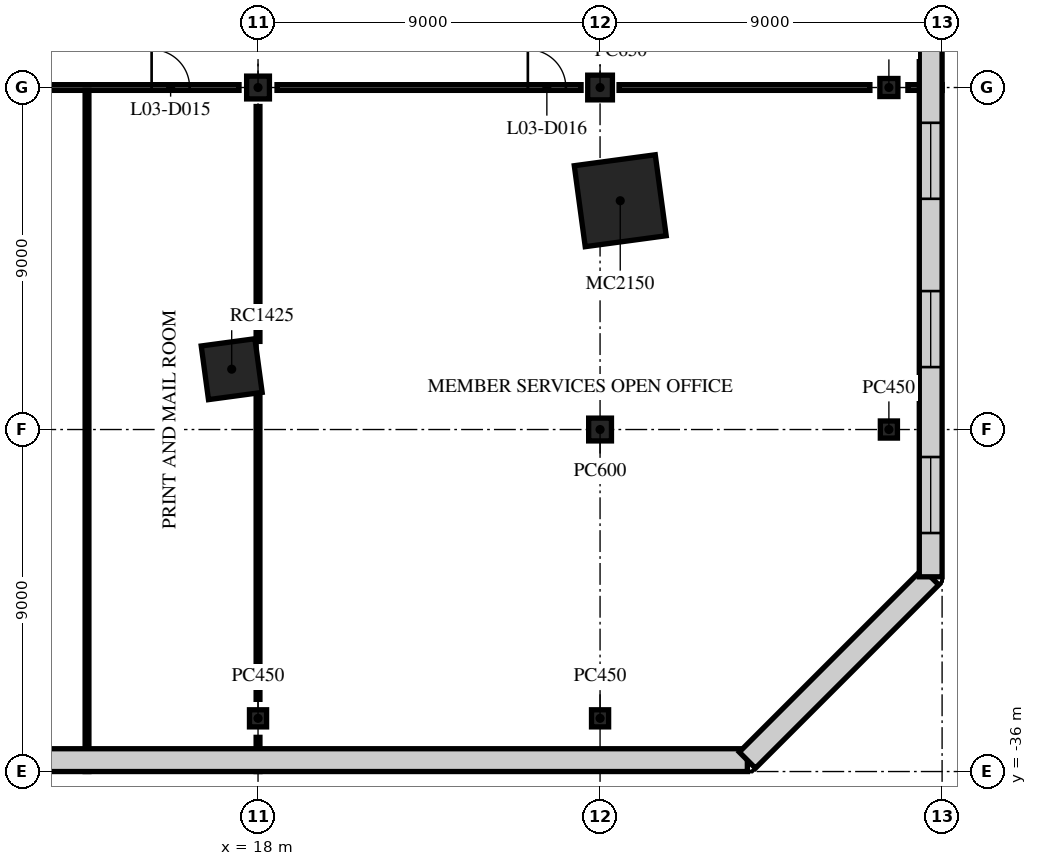
"""IFC4 building model, lengths in metres.
Left out: names, types, materials, properties, quantities, classifications, styles, units other than length and angle.
Written with IfcOpenShell. Run it as: python <this file> out.ifc"""

import sys

from ifc_helpers import new_model, si_unit, direction, frame, frame_2d, origin, origin_2d, place, context, subcontext, project, spatial, rectangle, extrude, element, fill, save


model = new_model("IFC4")
c1 = context("Model", 3, precision=1e-05, world=origin(), true_north=direction((0.0, 1.0)))
c2 = subcontext(c1, "Body", "Model", "MODEL_VIEW")
j1 = project(units=[si_unit("LENGTHUNIT", "METRE"), si_unit("PLANEANGLEUNIT", "RADIAN")], contexts=[c1])
p1 = place(None, origin())
s1 = spatial("IfcSite", under=j1, at=p1, CompositionType="ELEMENT")
p2 = place(p1, origin())
s2 = spatial("IfcBuilding", under=s1, at=p2, CompositionType="ELEMENT")
p3 = place(p2, frame((0.0, 0.0, 13.5)))
s3 = spatial("IfcBuildingStorey", under=s2, at=p3, CompositionType="ELEMENT", Elevation=13.5)
p4 = place(p3, frame((18.0, -34.6, 0.0), z_axis=(0.0, 0.0, 1.0), x_axis=(1.0, 0.0, 0.0)))
e1 = element("IfcColumn", 1, at=p4, inside=s3, PredefinedType="COLUMN", context=c2, shape_type="SweptSolid", body=[
    extrude(rectangle(XDim=0.45, YDim=0.45, at=origin_2d()), origin(), (0.0, 0.0, 1.0), 4.5),
])
p5 = place(p3, frame((18.0, -18.0, 0.0), z_axis=(0.0, 0.0, 1.0), x_axis=(1.0, 0.0, 0.0)))
e2 = element("IfcColumn", 2, at=p5, inside=s3, PredefinedType="COLUMN", context=c2, shape_type="SweptSolid", body=[
    extrude(rectangle(XDim=0.6, YDim=0.6, at=origin_2d()), origin(), (0.0, 0.0, 1.0), 4.5),
])
p6 = place(p3, frame((27.0, -34.6, 0.0), z_axis=(0.0, 0.0, 1.0), x_axis=(1.0, 0.0, 0.0)))
e3 = element("IfcColumn", 3, at=p6, inside=s3, PredefinedType="COLUMN", context=c2, shape_type="SweptSolid", body=[
    extrude(rectangle(XDim=0.45, YDim=0.45, at=origin_2d()), origin(), (0.0, 0.0, 1.0), 4.5),
])
p7 = place(p3, frame((27.0, -27.0, 0.0), z_axis=(0.0, 0.0, 1.0), x_axis=(1.0, 0.0, 0.0)))
e4 = element("IfcColumn", 4, at=p7, inside=s3, PredefinedType="COLUMN", context=c2, shape_type="SweptSolid", body=[
    extrude(rectangle(XDim=0.6, YDim=0.6, at=origin_2d()), origin(), (0.0, 0.0, 1.0), 4.5),
])
p8 = place(p3, frame((27.0, -18.0, 0.0), z_axis=(0.0, 0.0, 1.0), x_axis=(1.0, 0.0, 0.0)))
e5 = element("IfcColumn", 5, at=p8, inside=s3, PredefinedType="COLUMN", context=c2, shape_type="SweptSolid", body=[
    extrude(rectangle(XDim=0.65, YDim=0.65, at=origin_2d()), origin(), (0.0, 0.0, 1.0), 4.5),
])
p9 = place(p3, frame((34.6, -27.0, 0.0), z_axis=(0.0, 0.0, 1.0), x_axis=(1.0, 0.0, 0.0)))
e6 = element("IfcColumn", 6, at=p9, inside=s3, PredefinedType="COLUMN", context=c2, shape_type="SweptSolid", body=[
    extrude(rectangle(XDim=0.45, YDim=0.45, at=origin_2d()), origin(), (0.0, 0.0, 1.0), 4.5),
])
p10 = place(p3, frame((34.6, -18.0, 0.0), z_axis=(0.0, 0.0, 1.0), x_axis=(1.0, 0.0, 0.0)))
e7 = element("IfcColumn", 7, at=p10, inside=s3, PredefinedType="COLUMN", context=c2, shape_type="SweptSolid", body=[
    extrude(rectangle(XDim=0.475, YDim=0.475, at=origin_2d()), origin(), (0.0, 0.0, 1.0), 4.5),
])
p11 = place(p3, frame((17.307, -25.412, 0.0), z_axis=(0.0, 0.0, 1.0), x_axis=(0.991001197216, 0.133853005627, 0.0)))
e8 = element("IfcColumn", 8, at=p11, inside=s3, PredefinedType="COLUMN", context=c2, shape_type="SweptSolid", body=[
    extrude(rectangle(XDim=1.425, YDim=1.425, at=origin_2d()), origin(), (0.0, 0.0, 1.0), 4.5),
])
p12 = place(p3, frame((27.531, -20.979, 0.0), z_axis=(0.0, 0.0, 1.0), x_axis=(0.991001197216, 0.133853005627, 0.0)))
e9 = element("IfcColumn", 9, at=p12, inside=s3, PredefinedType="COLUMN", context=c2, shape_type="SweptSolid", body=[
    extrude(rectangle(XDim=2.15, YDim=2.15, at=origin_2d()), origin(), (0.0, 0.0, 1.0), 4.5),
])
p13 = place(p3, frame((9.5, -18.0, 0.0), z_axis=(0.0, 0.0, 1.0), x_axis=(1.0, 0.0, 0.0)))
e10 = element("IfcWall", 10, at=p13, inside=s3, PredefinedType="PARTITIONING", context=c2, shape_type="SweptSolid", body=[
    extrude(rectangle(XDim=8.0, YDim=0.15, at=frame_2d((4.0, 0.0))), origin(), (0.0, 0.0, 1.0), 4.1),
])
p14 = place(p13, frame((5.7, 0.0, 0.0)))
e11 = element("IfcOpeningElement", 11, at=p14, cuts=e10, PredefinedType="OPENING", context=c2, shape_type="SweptSolid", body=[
    extrude(rectangle(XDim=1.0, YDim=2.1, at=frame_2d((0.5, 1.05))), frame((0.0, 0.085, 0.0), z_axis=(0.0, -1.0, 0.0), x_axis=(1.0, 0.0, 0.0)), (0.0, 0.0, 1.0), 0.17),
])
p15 = place(p3, frame((18.5, -18.0, 0.0), z_axis=(0.0, 0.0, 1.0), x_axis=(1.0, 0.0, 0.0)))
e12 = element("IfcWall", 12, at=p15, inside=s3, PredefinedType="PARTITIONING", context=c2, shape_type="SweptSolid", body=[
    extrude(rectangle(XDim=8.0, YDim=0.15, at=frame_2d((4.0, 0.0))), origin(), (0.0, 0.0, 1.0), 4.1),
])
p16 = place(p15, frame((6.6, 0.0, 0.0)))
e13 = element("IfcOpeningElement", 13, at=p16, cuts=e12, PredefinedType="OPENING", context=c2, shape_type="SweptSolid", body=[
    extrude(rectangle(XDim=1.0, YDim=2.1, at=frame_2d((0.5, 1.05))), frame((0.0, 0.085, 0.0), z_axis=(0.0, -1.0, 0.0), x_axis=(1.0, 0.0, 0.0)), (0.0, 0.0, 1.0), 0.17),
])
p17 = place(p3, frame((27.5, -18.0, 0.0), z_axis=(0.0, 0.0, 1.0), x_axis=(1.0, 0.0, 0.0)))
e14 = element("IfcWall", 14, at=p17, inside=s3, PredefinedType="PARTITIONING", context=c2, shape_type="SweptSolid", body=[
    extrude(rectangle(XDim=6.6, YDim=0.15, at=frame_2d((3.3, 0.0))), origin(), (0.0, 0.0, 1.0), 4.1),
])
p18 = place(p3, frame((35.1, -18.0, 0.0), z_axis=(0.0, 0.0, 1.0), x_axis=(1.0, 0.0, 0.0)))
e15 = element("IfcWall", 15, at=p18, inside=s3, PredefinedType="PARTITIONING", context=c2, shape_type="SweptSolid", body=[
    extrude(rectangle(XDim=0.9, YDim=0.15, at=frame_2d((0.45, 0.0))), origin(), (0.0, 0.0, 1.0), 4.1),
])
p19 = place(p3, frame((13.5, -36.0, 0.0), z_axis=(0.0, 0.0, 1.0), x_axis=(0.0, 1.0, 0.0)))
e16 = element("IfcWall", 16, at=p19, inside=s3, PredefinedType="PARTITIONING", context=c2, shape_type="SweptSolid", body=[
    extrude(rectangle(XDim=17.925, YDim=0.1, at=frame_2d((8.962, 0.0))), origin(), (0.0, 0.0, 1.0), 4.1),
])
p20 = place(p3, frame((18.0, -36.0, 0.0), z_axis=(0.0, 0.0, 1.0), x_axis=(0.0, 1.0, 0.0)))
e17 = element("IfcWall", 17, at=p20, inside=s3, PredefinedType="PARTITIONING", context=c2, shape_type="SweptSolid", body=[
    extrude(rectangle(XDim=0.9, YDim=0.1, at=frame_2d((0.45, 0.0))), origin(), (0.0, 0.0, 1.0), 4.1),
])
p21 = place(p3, frame((18.0, -34.1, 0.0), z_axis=(0.0, 0.0, 1.0), x_axis=(0.0, 1.0, 0.0)))
e18 = element("IfcWall", 18, at=p21, inside=s3, PredefinedType="PARTITIONING", context=c2, shape_type="SweptSolid", body=[
    extrude(rectangle(XDim=7.957, YDim=0.1, at=frame_2d((3.979, 0.0))), origin(), (0.0, 0.0, 1.0), 4.1),
])
p22 = place(p3, frame((18.0, -24.681, 0.0), z_axis=(0.0, 0.0, 1.0), x_axis=(0.0, 1.0, 0.0)))
e19 = element("IfcWall", 19, at=p22, inside=s3, PredefinedType="PARTITIONING", context=c2, shape_type="SweptSolid", body=[
    extrude(rectangle(XDim=6.181, YDim=0.1, at=frame_2d((3.09, 0.0))), origin(), (0.0, 0.0, 1.0), 4.1),
])
p23 = place(p3, frame((-30.876, -35.7, 0.0), z_axis=(0.0, 0.0, 1.0), x_axis=(1.0, 0.0, 0.0)))
e20 = element("IfcWall", 20, at=p23, inside=s3, PredefinedType="STANDARD", context=c2, shape_type="SweptSolid", body=[
    extrude(rectangle(XDim=61.751, YDim=0.6, at=frame_2d((30.876, 0.0))), origin(), (0.0, 0.0, 1.0), 4.1),
])
p24 = place(p3, frame((30.876, -35.7, 0.0), z_axis=(0.0, 0.0, 1.0), x_axis=(0.707106781187, 0.707106781187, 0.0)))
e21 = element("IfcWall", 21, at=p24, inside=s3, PredefinedType="STANDARD", context=c2, shape_type="SweptSolid", body=[
    extrude(rectangle(XDim=6.823, YDim=0.6, at=frame_2d((3.411, 0.0))), origin(), (0.0, 0.0, 1.0), 4.1),
])
p25 = place(p3, frame((35.7, -30.876, 0.0), z_axis=(0.0, 0.0, 1.0), x_axis=(0.0, 1.0, 0.0)))
e22 = element("IfcWall", 22, at=p25, inside=s3, PredefinedType="STANDARD", context=c2, shape_type="SweptSolid", body=[
    extrude(rectangle(XDim=61.751, YDim=0.6, at=frame_2d((30.876, 0.0))), origin(), (0.0, 0.0, 1.0), 4.1),
])
p26 = place(p25, frame((1.152, 0.0, 0.9)))
e23 = element("IfcOpeningElement", 23, at=p26, cuts=e22, PredefinedType="OPENING", context=c2, shape_type="SweptSolid", body=[
    extrude(rectangle(XDim=2.0, YDim=3.0, at=frame_2d((1.0, 1.5))), frame((0.0, 0.31, 0.0), z_axis=(0.0, -1.0, 0.0), x_axis=(1.0, 0.0, 0.0)), (0.0, 0.0, 1.0), 0.62),
])
p27 = place(p25, frame((5.519, 0.0, 0.9)))
e24 = element("IfcOpeningElement", 24, at=p27, cuts=e22, PredefinedType="OPENING", context=c2, shape_type="SweptSolid", body=[
    extrude(rectangle(XDim=2.0, YDim=3.0, at=frame_2d((1.0, 1.5))), frame((0.0, 0.31, 0.0), z_axis=(0.0, -1.0, 0.0), x_axis=(1.0, 0.0, 0.0)), (0.0, 0.0, 1.0), 0.62),
])
p28 = place(p25, frame((9.947, 0.0, 0.9)))
e25 = element("IfcOpeningElement", 25, at=p28, cuts=e22, PredefinedType="OPENING", context=c2, shape_type="SweptSolid", body=[
    extrude(rectangle(XDim=2.0, YDim=3.0, at=frame_2d((1.0, 1.5))), frame((0.0, 0.31, 0.0), z_axis=(0.0, -1.0, 0.0), x_axis=(1.0, 0.0, 0.0)), (0.0, 0.0, 1.0), 0.62),
])
p29 = place(p25, frame((14.376, 0.0, 0.9)))
e26 = element("IfcOpeningElement", 26, at=p29, cuts=e22, PredefinedType="OPENING", context=c2, shape_type="SweptSolid", body=[
    extrude(rectangle(XDim=2.0, YDim=3.0, at=frame_2d((1.0, 1.5))), frame((0.0, 0.31, 0.0), z_axis=(0.0, -1.0, 0.0), x_axis=(1.0, 0.0, 0.0)), (0.0, 0.0, 1.0), 0.62),
])
p30 = place(p25, frame((18.804, 0.0, 0.9)))
e27 = element("IfcOpeningElement", 27, at=p30, cuts=e22, PredefinedType="OPENING", context=c2, shape_type="SweptSolid", body=[
    extrude(rectangle(XDim=2.0, YDim=3.0, at=frame_2d((1.0, 1.5))), frame((0.0, 0.31, 0.0), z_axis=(0.0, -1.0, 0.0), x_axis=(1.0, 0.0, 0.0)), (0.0, 0.0, 1.0), 0.62),
])
p31 = place(p25, frame((23.233, 0.0, 0.9)))
e28 = element("IfcOpeningElement", 28, at=p31, cuts=e22, PredefinedType="OPENING", context=c2, shape_type="SweptSolid", body=[
    extrude(rectangle(XDim=2.0, YDim=3.0, at=frame_2d((1.0, 1.5))), frame((0.0, 0.31, 0.0), z_axis=(0.0, -1.0, 0.0), x_axis=(1.0, 0.0, 0.0)), (0.0, 0.0, 1.0), 0.62),
])
p32 = place(p25, frame((27.662, 0.0, 0.9)))
e29 = element("IfcOpeningElement", 29, at=p32, cuts=e22, PredefinedType="OPENING", context=c2, shape_type="SweptSolid", body=[
    extrude(rectangle(XDim=2.0, YDim=3.0, at=frame_2d((1.0, 1.5))), frame((0.0, 0.31, 0.0), z_axis=(0.0, -1.0, 0.0), x_axis=(1.0, 0.0, 0.0)), (0.0, 0.0, 1.0), 0.62),
])
p33 = place(p25, frame((32.09, 0.0, 0.9)))
e30 = element("IfcOpeningElement", 30, at=p33, cuts=e22, PredefinedType="OPENING", context=c2, shape_type="SweptSolid", body=[
    extrude(rectangle(XDim=2.0, YDim=3.0, at=frame_2d((1.0, 1.5))), frame((0.0, 0.31, 0.0), z_axis=(0.0, -1.0, 0.0), x_axis=(1.0, 0.0, 0.0)), (0.0, 0.0, 1.0), 0.62),
])
p34 = place(p25, frame((36.519, 0.0, 0.9)))
e31 = element("IfcOpeningElement", 31, at=p34, cuts=e22, PredefinedType="OPENING", context=c2, shape_type="SweptSolid", body=[
    extrude(rectangle(XDim=2.0, YDim=3.0, at=frame_2d((1.0, 1.5))), frame((0.0, 0.31, 0.0), z_axis=(0.0, -1.0, 0.0), x_axis=(1.0, 0.0, 0.0)), (0.0, 0.0, 1.0), 0.62),
])
p35 = place(p25, frame((45.376, 0.0, 0.9)))
e32 = element("IfcOpeningElement", 32, at=p35, cuts=e22, PredefinedType="OPENING", context=c2, shape_type="SweptSolid", body=[
    extrude(rectangle(XDim=2.0, YDim=3.0, at=frame_2d((1.0, 1.5))), frame((0.0, 0.31, 0.0), z_axis=(0.0, -1.0, 0.0), x_axis=(1.0, 0.0, 0.0)), (0.0, 0.0, 1.0), 0.62),
])
p36 = place(p25, frame((49.804, 0.0, 0.9)))
e33 = element("IfcOpeningElement", 33, at=p36, cuts=e22, PredefinedType="OPENING", context=c2, shape_type="SweptSolid", body=[
    extrude(rectangle(XDim=2.0, YDim=3.0, at=frame_2d((1.0, 1.5))), frame((0.0, 0.31, 0.0), z_axis=(0.0, -1.0, 0.0), x_axis=(1.0, 0.0, 0.0)), (0.0, 0.0, 1.0), 0.62),
])
p37 = place(p25, frame((58.599, 0.0, 0.9)))
e34 = element("IfcOpeningElement", 34, at=p37, cuts=e22, PredefinedType="OPENING", context=c2, shape_type="SweptSolid", body=[
    extrude(rectangle(XDim=2.0, YDim=3.0, at=frame_2d((1.0, 1.5))), frame((0.0, 0.31, 0.0), z_axis=(0.0, -1.0, 0.0), x_axis=(1.0, 0.0, 0.0)), (0.0, 0.0, 1.0), 0.62),
])
p38 = place(p14, origin())
e35 = element("IfcDoor", 35, at=p38, inside=s3, OperationType="SINGLE_SWING_LEFT", PredefinedType="DOOR", context=c2, shape_type="SweptSolid", body=[
    extrude(rectangle(XDim=1.0, YDim=2.1, at=frame_2d((0.5, 1.05))), frame((0.0, 0.025, 0.0), z_axis=(0.0, -1.0, 0.0), x_axis=(1.0, 0.0, 0.0)), (0.0, 0.0, 1.0), 0.05),
])
fill(e11, e35)
p39 = place(p16, origin())
e36 = element("IfcDoor", 36, at=p39, inside=s3, OperationType="SINGLE_SWING_RIGHT", PredefinedType="DOOR", context=c2, shape_type="SweptSolid", body=[
    extrude(rectangle(XDim=1.0, YDim=2.1, at=frame_2d((0.5, 1.05))), frame((0.0, 0.025, 0.0), z_axis=(0.0, -1.0, 0.0), x_axis=(1.0, 0.0, 0.0)), (0.0, 0.0, 1.0), 0.05),
])
fill(e13, e36)
p40 = place(p26, origin())
e37 = element("IfcWindow", 37, at=p40, inside=s3, PartitioningType="SINGLE_PANEL", PredefinedType="WINDOW", context=c2, shape_type="SweptSolid", body=[
    extrude(rectangle(XDim=2.0, YDim=3.0, at=frame_2d((1.0, 1.5))), frame((0.0, 0.03, 0.0), z_axis=(0.0, -1.0, 0.0), x_axis=(1.0, 0.0, 0.0)), (0.0, 0.0, 1.0), 0.06),
])
fill(e23, e37)
p41 = place(p27, origin())
e38 = element("IfcWindow", 38, at=p41, inside=s3, PartitioningType="SINGLE_PANEL", PredefinedType="WINDOW", context=c2, shape_type="SweptSolid", body=[
    extrude(rectangle(XDim=2.0, YDim=3.0, at=frame_2d((1.0, 1.5))), frame((0.0, 0.03, 0.0), z_axis=(0.0, -1.0, 0.0), x_axis=(1.0, 0.0, 0.0)), (0.0, 0.0, 1.0), 0.06),
])
fill(e24, e38)
p42 = place(p28, origin())
e39 = element("IfcWindow", 39, at=p42, inside=s3, PartitioningType="SINGLE_PANEL", PredefinedType="WINDOW", context=c2, shape_type="SweptSolid", body=[
    extrude(rectangle(XDim=2.0, YDim=3.0, at=frame_2d((1.0, 1.5))), frame((0.0, 0.03, 0.0), z_axis=(0.0, -1.0, 0.0), x_axis=(1.0, 0.0, 0.0)), (0.0, 0.0, 1.0), 0.06),
])
fill(e25, e39)
save(model, sys.argv[1])
